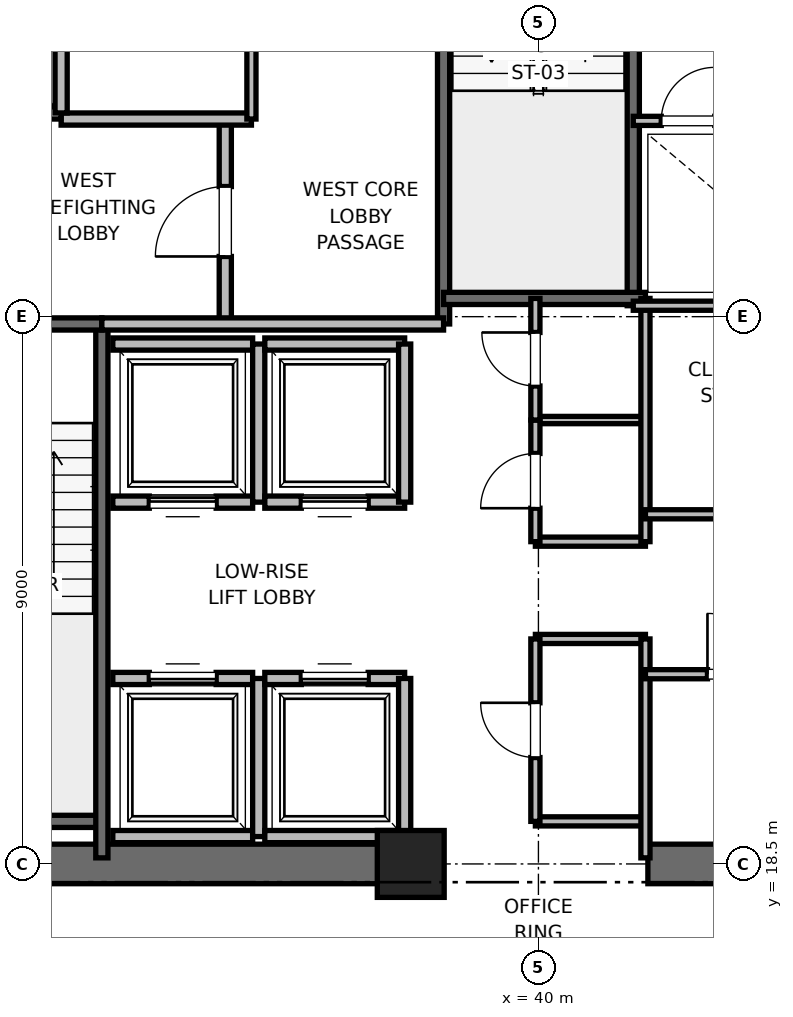
"""IFC4 building model, lengths in metres.
Left out: names, types, materials, properties, quantities, classifications, styles, units other than length and angle.
Written with IfcOpenShell. Run it as: python <this file> out.ifc"""

import sys

from ifc_helpers import new_model, si_unit, direction, frame, frame_2d, origin, origin_2d, place, context, subcontext, project, spatial, rectangle, extrude, element, fill, save


model = new_model("IFC4")
c1 = context("Model", 3, precision=1e-05, world=origin(), true_north=direction((0.0, 1.0)))
c2 = subcontext(c1, "Body", "Model", "MODEL_VIEW")
j1 = project(units=[si_unit("LENGTHUNIT", "METRE"), si_unit("PLANEANGLEUNIT", "RADIAN")], contexts=[c1])
p1 = place(None, origin())
s1 = spatial("IfcSite", under=j1, at=p1, CompositionType="ELEMENT")
p2 = place(p1, origin())
s2 = spatial("IfcBuilding", under=s1, at=p2, CompositionType="ELEMENT")
p3 = place(p2, frame((0.0, 0.0, 83.6)))
s3 = spatial("IfcBuildingStorey", under=s2, at=p3, CompositionType="ELEMENT", Elevation=83.6)
p4 = place(p3, frame((37.9, 18.5, 0.0), z_axis=(0.0, 0.0, 1.0), x_axis=(1.0, 0.0, 0.0)))
e1 = element("IfcColumn", 1, at=p4, inside=s3, PredefinedType="PILASTER", context=c2, shape_type="SweptSolid", body=[
    extrude(rectangle(XDim=1.1, YDim=1.1, at=origin_2d()), origin(), (0.0, 0.0, 1.0), 4.0),
])
for number, where, z_axis, x_axis in (
    (2, (29.0, 18.5, 0.0), (0.0, 0.0, 1.0), (1.0, 0.0, 0.0)),
    (3, (41.8, 18.5, 0.0), (0.0, 0.0, 1.0), (1.0, 0.0, 0.0)),
):
    element("IfcWall", number, at=place(p3, frame(where, z_axis=z_axis, x_axis=x_axis)), inside=s3, PredefinedType="SHEAR", context=c2, shape_type="SweptSolid", body=[
        extrude(rectangle(XDim=9.2, YDim=0.65, at=frame_2d((4.6, 0.0))), origin(), (0.0, 0.0, 1.0), 3.76),
    ])
p5 = place(p3, frame((29.7, 19.2, 0.0), z_axis=(0.0, 0.0, 1.0), x_axis=(1.0, 0.0, 0.0)))
e4 = element("IfcWall", 4, at=p5, inside=s3, PredefinedType="SOLIDWALL", context=c2, shape_type="SweptSolid", body=[
    extrude(rectangle(XDim=3.12, YDim=0.2, at=frame_2d((1.56, 0.0))), origin(), (0.0, 0.0, 1.0), 3.76),
])
p6 = place(p3, frame((32.82, 18.6, 0.0), z_axis=(0.0, 0.0, 1.0), x_axis=(0.0, 1.0, 0.0)))
e5 = element("IfcWall", 5, at=p6, inside=s3, PredefinedType="SOLIDWALL", context=c2, shape_type="SweptSolid", body=[
    extrude(rectangle(XDim=8.78, YDim=0.2, at=frame_2d((4.39, 0.0))), origin(), (0.0, 0.0, 1.0), 3.76),
])
p7 = place(p3, frame((29.7, 27.38, 0.0), z_axis=(0.0, 0.0, 1.0), x_axis=(1.0, 0.0, 0.0)))
e6 = element("IfcWall", 6, at=p7, inside=s3, PredefinedType="SOLIDWALL", context=c2, shape_type="SweptSolid", body=[
    extrude(rectangle(XDim=3.12, YDim=0.2, at=frame_2d((1.56, 0.0))), origin(), (0.0, 0.0, 1.0), 3.76),
])
p8 = place(p7, frame((1.01, 0.0, 0.0)))
e7 = element("IfcOpeningElement", 7, at=p8, cuts=e6, PredefinedType="OPENING", context=c2, shape_type="SweptSolid", body=[
    extrude(rectangle(XDim=1.1, YDim=2.15, at=frame_2d((0.55, 1.075))), frame((0.0, 0.1, 0.0), z_axis=(0.0, -1.0, 0.0), x_axis=(1.0, 0.0, 0.0)), (0.0, 0.0, 1.0), 0.2),
])
p9 = place(p3, frame((38.44, 27.38, 0.0), z_axis=(0.0, 0.0, 1.0), x_axis=(0.0, 1.0, 0.0)))
e8 = element("IfcWall", 8, at=p9, inside=s3, PredefinedType="SOLIDWALL", context=c2, shape_type="SweptSolid", body=[
    extrude(rectangle(XDim=8.87, YDim=0.2, at=frame_2d((4.435, 0.0))), origin(), (0.0, 0.0, 1.0), 3.76),
])
p10 = place(p3, frame((41.56, 27.68, 0.0), z_axis=(0.0, 0.0, 1.0), x_axis=(0.0, 1.0, 0.0)))
e9 = element("IfcWall", 9, at=p10, inside=s3, PredefinedType="SOLIDWALL", context=c2, shape_type="SweptSolid", body=[
    extrude(rectangle(XDim=8.57, YDim=0.2, at=frame_2d((4.285, 0.0))), origin(), (0.0, 0.0, 1.0), 3.76),
])
p11 = place(p3, frame((38.44, 27.8, 0.0), z_axis=(0.0, 0.0, 1.0), x_axis=(1.0, 0.0, 0.0)))
e10 = element("IfcWall", 10, at=p11, inside=s3, PredefinedType="SOLIDWALL", context=c2, shape_type="SweptSolid", body=[
    extrude(rectangle(XDim=3.32, YDim=0.2, at=frame_2d((1.66, 0.0))), origin(), (0.0, 0.0, 1.0), 3.76),
])
p12 = place(p3, frame((34.85, 27.38, 0.0), z_axis=(0.0, 0.0, 1.0), x_axis=(0.0, 1.0, 0.0)))
e11 = element("IfcWall", 11, at=p12, inside=s3, PredefinedType="PARTITIONING", context=c2, shape_type="SweptSolid", body=[
    extrude(rectangle(XDim=3.37, YDim=0.2, at=frame_2d((1.685, 0.0))), origin(), (0.0, 0.0, 1.0), 3.76),
])
p13 = place(p12, frame((1.11, 0.0, 0.0)))
e12 = element("IfcOpeningElement", 12, at=p13, cuts=e11, PredefinedType="OPENING", context=c2, shape_type="SweptSolid", body=[
    extrude(rectangle(XDim=1.15, YDim=2.2, at=frame_2d((0.575, 1.1))), frame((0.0, 0.1, 0.0), z_axis=(0.0, -1.0, 0.0), x_axis=(1.0, 0.0, 0.0)), (0.0, 0.0, 1.0), 0.2),
])
p14 = place(p3, frame((32.82, 27.38, 0.0), z_axis=(0.0, 0.0, 1.0), x_axis=(1.0, 0.0, 0.0)))
e13 = element("IfcWall", 13, at=p14, inside=s3, PredefinedType="PARTITIONING", context=c2, shape_type="SweptSolid", body=[
    extrude(rectangle(XDim=5.62, YDim=0.2, at=frame_2d((2.81, 0.0))), origin(), (0.0, 0.0, 1.0), 3.76),
])
p15 = place(p3, frame((32.15, 30.75, 0.0), z_axis=(0.0, 0.0, 1.0), x_axis=(1.0, 0.0, 0.0)))
e14 = element("IfcWall", 14, at=p15, inside=s3, PredefinedType="PARTITIONING", context=c2, shape_type="SweptSolid", body=[
    extrude(rectangle(XDim=3.13, YDim=0.2, at=frame_2d((1.565, 0.0))), origin(), (0.0, 0.0, 1.0), 3.76),
])
p16 = place(p3, frame((29.55, 30.85, 0.0), z_axis=(0.0, 0.0, 1.0), x_axis=(1.0, 0.0, 0.0)))
e15 = element("IfcWall", 15, at=p16, inside=s3, PredefinedType="SOLIDWALL", context=c2, shape_type="SweptSolid", body=[
    extrude(rectangle(XDim=2.6, YDim=0.2, at=frame_2d((1.3, 0.0))), origin(), (0.0, 0.0, 1.0), 2.54),
])
p17 = place(p16, frame((0.75, 0.0, 0.0)))
e16 = element("IfcOpeningElement", 16, at=p17, cuts=e15, PredefinedType="OPENING", context=c2, shape_type="SweptSolid", body=[
    extrude(rectangle(XDim=1.1, YDim=2.2, at=frame_2d((0.55, 1.1))), frame((0.0, 0.1, 0.0), z_axis=(0.0, -1.0, 0.0), x_axis=(1.0, 0.0, 0.0)), (0.0, 0.0, 1.0), 0.2),
])
p18 = place(p3, frame((32.15, 30.85, 0.0), z_axis=(0.0, 0.0, 1.0), x_axis=(0.0, 1.0, 0.0)))
e17 = element("IfcWall", 17, at=p18, inside=s3, PredefinedType="SOLIDWALL", context=c2, shape_type="SweptSolid", body=[
    extrude(rectangle(XDim=3.0, YDim=0.2, at=frame_2d((1.5, 0.0))), origin(), (0.0, 0.0, 1.0), 3.76),
])
p19 = place(p3, frame((33.0, 18.95, 0.0), z_axis=(0.0, 0.0, 1.0), x_axis=(1.0, 0.0, 0.0)))
e18 = element("IfcWall", 18, at=p19, inside=s3, PredefinedType="SOLIDWALL", context=c2, shape_type="SweptSolid", body=[
    extrude(rectangle(XDim=2.3, YDim=0.2, at=frame_2d((1.15, 0.0))), origin(), (0.0, 0.0, 1.0), 3.76),
])
p20 = place(p3, frame((35.3, 21.55, 0.0), z_axis=(0.0, 0.0, 1.0), x_axis=(-1.0, 0.0, 0.0)))
e19 = element("IfcWall", 19, at=p20, inside=s3, PredefinedType="SOLIDWALL", context=c2, shape_type="SweptSolid", body=[
    extrude(rectangle(XDim=2.3, YDim=0.2, at=frame_2d((1.15, 0.0))), origin(), (0.0, 0.0, 1.0), 3.76),
])
p21 = place(p20, frame((0.6, 0.0, 0.0)))
e20 = element("IfcOpeningElement", 20, at=p21, cuts=e19, PredefinedType="OPENING", context=c2, shape_type="SweptSolid", body=[
    extrude(rectangle(XDim=1.1, YDim=2.2, at=frame_2d((0.55, 1.1))), frame((0.0, 0.1, 0.0), z_axis=(0.0, -1.0, 0.0), x_axis=(1.0, 0.0, 0.0)), (0.0, 0.0, 1.0), 0.2),
])
p22 = place(p3, frame((35.4, 18.95, 0.0), z_axis=(0.0, 0.0, 1.0), x_axis=(0.0, 1.0, 0.0)))
e21 = element("IfcWall", 21, at=p22, inside=s3, PredefinedType="SOLIDWALL", context=c2, shape_type="SweptSolid", body=[
    extrude(rectangle(XDim=2.6, YDim=0.2, at=frame_2d((1.3, 0.0))), origin(), (0.0, 0.0, 1.0), 3.76),
])
p23 = place(p3, frame((35.5, 18.95, 0.0), z_axis=(0.0, 0.0, 1.0), x_axis=(1.0, 0.0, 0.0)))
e22 = element("IfcWall", 22, at=p23, inside=s3, PredefinedType="SOLIDWALL", context=c2, shape_type="SweptSolid", body=[
    extrude(rectangle(XDim=2.3, YDim=0.2, at=frame_2d((1.15, 0.0))), origin(), (0.0, 0.0, 1.0), 2.54),
])
p24 = place(p3, frame((37.8, 21.55, 0.0), z_axis=(0.0, 0.0, 1.0), x_axis=(-1.0, 0.0, 0.0)))
e23 = element("IfcWall", 23, at=p24, inside=s3, PredefinedType="SOLIDWALL", context=c2, shape_type="SweptSolid", body=[
    extrude(rectangle(XDim=2.3, YDim=0.2, at=frame_2d((1.15, 0.0))), origin(), (0.0, 0.0, 1.0), 3.76),
])
p25 = place(p24, frame((0.6, 0.0, 0.0)))
e24 = element("IfcOpeningElement", 24, at=p25, cuts=e23, PredefinedType="OPENING", context=c2, shape_type="SweptSolid", body=[
    extrude(rectangle(XDim=1.1, YDim=2.2, at=frame_2d((0.55, 1.1))), frame((0.0, 0.1, 0.0), z_axis=(0.0, -1.0, 0.0), x_axis=(1.0, 0.0, 0.0)), (0.0, 0.0, 1.0), 0.2),
])
p26 = place(p3, frame((37.8, 18.95, 0.0), z_axis=(0.0, 0.0, 1.0), x_axis=(0.0, 1.0, 0.0)))
e25 = element("IfcWall", 25, at=p26, inside=s3, PredefinedType="SOLIDWALL", context=c2, shape_type="SweptSolid", body=[
    extrude(rectangle(XDim=2.6, YDim=0.2, at=frame_2d((1.3, 0.0))), origin(), (0.0, 0.0, 1.0), 2.54),
])
p27 = place(p3, frame((33.0, 24.45, 0.0), z_axis=(0.0, 0.0, 1.0), x_axis=(1.0, 0.0, 0.0)))
e26 = element("IfcWall", 26, at=p27, inside=s3, PredefinedType="SOLIDWALL", context=c2, shape_type="SweptSolid", body=[
    extrude(rectangle(XDim=2.3, YDim=0.2, at=frame_2d((1.15, 0.0))), origin(), (0.0, 0.0, 1.0), 3.76),
])
p28 = place(p27, frame((0.6, 0.0, 0.0)))
e27 = element("IfcOpeningElement", 27, at=p28, cuts=e26, PredefinedType="OPENING", context=c2, shape_type="SweptSolid", body=[
    extrude(rectangle(XDim=1.1, YDim=2.2, at=frame_2d((0.55, 1.1))), frame((0.0, 0.1, 0.0), z_axis=(0.0, -1.0, 0.0), x_axis=(1.0, 0.0, 0.0)), (0.0, 0.0, 1.0), 0.2),
])
p29 = place(p3, frame((35.3, 27.05, 0.0), z_axis=(0.0, 0.0, 1.0), x_axis=(-1.0, 0.0, 0.0)))
e28 = element("IfcWall", 28, at=p29, inside=s3, PredefinedType="SOLIDWALL", context=c2, shape_type="SweptSolid", body=[
    extrude(rectangle(XDim=2.3, YDim=0.2, at=frame_2d((1.15, 0.0))), origin(), (0.0, 0.0, 1.0), 3.76),
])
p30 = place(p3, frame((35.4, 24.45, 0.0), z_axis=(0.0, 0.0, 1.0), x_axis=(0.0, 1.0, 0.0)))
e29 = element("IfcWall", 29, at=p30, inside=s3, PredefinedType="SOLIDWALL", context=c2, shape_type="SweptSolid", body=[
    extrude(rectangle(XDim=2.6, YDim=0.2, at=frame_2d((1.3, 0.0))), origin(), (0.0, 0.0, 1.0), 3.76),
])
p31 = place(p3, frame((35.5, 24.45, 0.0), z_axis=(0.0, 0.0, 1.0), x_axis=(1.0, 0.0, 0.0)))
e30 = element("IfcWall", 30, at=p31, inside=s3, PredefinedType="SOLIDWALL", context=c2, shape_type="SweptSolid", body=[
    extrude(rectangle(XDim=2.3, YDim=0.2, at=frame_2d((1.15, 0.0))), origin(), (0.0, 0.0, 1.0), 3.76),
])
p32 = place(p31, frame((0.6, 0.0, 0.0)))
e31 = element("IfcOpeningElement", 31, at=p32, cuts=e30, PredefinedType="OPENING", context=c2, shape_type="SweptSolid", body=[
    extrude(rectangle(XDim=1.1, YDim=2.2, at=frame_2d((0.55, 1.1))), frame((0.0, 0.1, 0.0), z_axis=(0.0, -1.0, 0.0), x_axis=(1.0, 0.0, 0.0)), (0.0, 0.0, 1.0), 0.2),
])
p33 = place(p3, frame((37.8, 27.05, 0.0), z_axis=(0.0, 0.0, 1.0), x_axis=(-1.0, 0.0, 0.0)))
e32 = element("IfcWall", 32, at=p33, inside=s3, PredefinedType="SOLIDWALL", context=c2, shape_type="SweptSolid", body=[
    extrude(rectangle(XDim=2.3, YDim=0.2, at=frame_2d((1.15, 0.0))), origin(), (0.0, 0.0, 1.0), 3.76),
])
p34 = place(p3, frame((37.8, 24.45, 0.0), z_axis=(0.0, 0.0, 1.0), x_axis=(0.0, 1.0, 0.0)))
e33 = element("IfcWall", 33, at=p34, inside=s3, PredefinedType="SOLIDWALL", context=c2, shape_type="SweptSolid", body=[
    extrude(rectangle(XDim=2.6, YDim=0.2, at=frame_2d((1.3, 0.0))), origin(), (0.0, 0.0, 1.0), 3.76),
])
for number, where, z_axis, x_axis in (
    (34, (39.95, 19.2, 0.0), (0.0, 0.0, 1.0), (1.0, 0.0, 0.0)),
    (35, (39.95, 22.2, 0.0), (0.0, 0.0, 1.0), (1.0, 0.0, 0.0)),
    (36, (39.95, 23.8, 0.0), (0.0, 0.0, 1.0), (1.0, 0.0, 0.0)),
):
    element("IfcWall", number, at=place(p3, frame(where, z_axis=z_axis, x_axis=x_axis)), inside=s3, PredefinedType="PARTITIONING", context=c2, shape_type="SweptSolid", body=[
        extrude(rectangle(XDim=1.81, YDim=0.15, at=frame_2d((0.905, 0.0))), origin(), (0.0, 0.0, 1.0), 2.85),
    ])
p35 = place(p3, frame((39.95, 25.8, 0.0), z_axis=(0.0, 0.0, 1.0), x_axis=(1.0, 0.0, 0.0)))
e37 = element("IfcWall", 37, at=p35, inside=s3, PredefinedType="PARTITIONING", context=c2, shape_type="SweptSolid", body=[
    extrude(rectangle(XDim=1.81, YDim=0.12, at=frame_2d((0.905, 0.0))), origin(), (0.0, 0.0, 1.0), 2.85),
])
p36 = place(p3, frame((41.76, 18.6, 0.0), z_axis=(0.0, 0.0, 1.0), x_axis=(0.0, 1.0, 0.0)))
e38 = element("IfcWall", 38, at=p36, inside=s3, PredefinedType="PARTITIONING", context=c2, shape_type="SweptSolid", body=[
    extrude(rectangle(XDim=3.6, YDim=0.15, at=frame_2d((1.8, 0.0))), origin(), (0.0, 0.0, 1.0), 2.54),
])
p37 = place(p3, frame((41.76, 23.8, 0.0), z_axis=(0.0, 0.0, 1.0), x_axis=(0.0, 1.0, 0.0)))
e39 = element("IfcWall", 39, at=p37, inside=s3, PredefinedType="PARTITIONING", context=c2, shape_type="SweptSolid", body=[
    extrude(rectangle(XDim=4.0, YDim=0.15, at=frame_2d((2.0, 0.0))), origin(), (0.0, 0.0, 1.0), 2.85),
])
p38 = place(p3, frame((39.95, 19.2, 0.0), z_axis=(0.0, 0.0, 1.0), x_axis=(0.0, 1.0, 0.0)))
e40 = element("IfcWall", 40, at=p38, inside=s3, PredefinedType="PARTITIONING", context=c2, shape_type="SweptSolid", body=[
    extrude(rectangle(XDim=3.0, YDim=0.15, at=frame_2d((1.5, 0.0))), origin(), (0.0, 0.0, 1.0), 2.85),
])
p39 = place(p38, frame((1.05, 0.0, 0.0)))
e41 = element("IfcOpeningElement", 41, at=p39, cuts=e40, PredefinedType="OPENING", context=c2, shape_type="SweptSolid", body=[
    extrude(rectangle(XDim=0.9, YDim=2.1, at=frame_2d((0.45, 1.05))), frame((0.0, 0.075, 0.0), z_axis=(0.0, -1.0, 0.0), x_axis=(1.0, 0.0, 0.0)), (0.0, 0.0, 1.0), 0.15),
])
p40 = place(p3, frame((39.95, 23.8, 0.0), z_axis=(0.0, 0.0, 1.0), x_axis=(0.0, 1.0, 0.0)))
e42 = element("IfcWall", 42, at=p40, inside=s3, PredefinedType="PARTITIONING", context=c2, shape_type="SweptSolid", body=[
    extrude(rectangle(XDim=2.0, YDim=0.15, at=frame_2d((1.0, 0.0))), origin(), (0.0, 0.0, 1.0), 2.85),
])
p41 = place(p40, frame((0.55, 0.0, 0.0)))
e43 = element("IfcOpeningElement", 43, at=p41, cuts=e42, PredefinedType="OPENING", context=c2, shape_type="SweptSolid", body=[
    extrude(rectangle(XDim=0.9, YDim=2.1, at=frame_2d((0.45, 1.05))), frame((0.0, 0.075, 0.0), z_axis=(0.0, -1.0, 0.0), x_axis=(1.0, 0.0, 0.0)), (0.0, 0.0, 1.0), 0.15),
])
p42 = place(p3, frame((39.95, 25.8, 0.0), z_axis=(0.0, 0.0, 1.0), x_axis=(0.0, 1.0, 0.0)))
e44 = element("IfcWall", 44, at=p42, inside=s3, PredefinedType="PARTITIONING", context=c2, shape_type="SweptSolid", body=[
    extrude(rectangle(XDim=2.0, YDim=0.15, at=frame_2d((1.0, 0.0))), origin(), (0.0, 0.0, 1.0), 2.85),
])
p43 = place(p42, frame((0.56, 0.0, 0.0)))
e45 = element("IfcOpeningElement", 45, at=p43, cuts=e44, PredefinedType="OPENING", context=c2, shape_type="SweptSolid", body=[
    extrude(rectangle(XDim=0.88, YDim=2.1, at=frame_2d((0.44, 1.05))), frame((0.0, 0.075, 0.0), z_axis=(0.0, -1.0, 0.0), x_axis=(1.0, 0.0, 0.0)), (0.0, 0.0, 1.0), 0.15),
])
p44 = place(p3, frame((35.28, 30.75, 0.0), z_axis=(0.0, 0.0, 1.0), x_axis=(0.0, 1.0, 0.0)))
e46 = element("IfcWall", 46, at=p44, inside=s3, PredefinedType="PARTITIONING", context=c2, shape_type="SweptSolid", body=[
    extrude(rectangle(XDim=3.2, YDim=0.15, at=frame_2d((1.6, 0.0))), origin(), (0.0, 0.0, 1.0), 2.85),
])
p45 = place(p44, frame((1.15, 0.0, 0.0)))
e47 = element("IfcOpeningElement", 47, at=p45, cuts=e46, PredefinedType="OPENING", context=c2, shape_type="SweptSolid", body=[
    extrude(rectangle(XDim=0.9, YDim=2.1, at=frame_2d((0.45, 1.05))), frame((0.0, 0.075, 0.0), z_axis=(0.0, -1.0, 0.0), x_axis=(1.0, 0.0, 0.0)), (0.0, 0.0, 1.0), 0.15),
])
p46 = place(p3, frame((41.56, 27.68, 0.0), z_axis=(0.0, 0.0, 1.0), x_axis=(1.0, 0.0, 0.0)))
e48 = element("IfcWall", 48, at=p46, inside=s3, PredefinedType="PARTITIONING", context=c2, shape_type="SweptSolid", body=[
    extrude(rectangle(XDim=3.59, YDim=0.15, at=frame_2d((1.795, 0.0))), origin(), (0.0, 0.0, 1.0), 2.85),
])
p47 = place(p3, frame((41.76, 21.62, 0.0), z_axis=(0.0, 0.0, 1.0), x_axis=(1.0, 0.0, 0.0)))
e49 = element("IfcWall", 49, at=p47, inside=s3, PredefinedType="PARTITIONING", context=c2, shape_type="SweptSolid", body=[
    extrude(rectangle(XDim=3.04, YDim=0.15, at=frame_2d((1.52, 0.0))), origin(), (0.0, 0.0, 1.0), 2.85),
])
p48 = place(p47, frame((1.02, 0.0, 0.0)))
e50 = element("IfcOpeningElement", 50, at=p48, cuts=e49, PredefinedType="OPENING", context=c2, shape_type="SweptSolid", body=[
    extrude(rectangle(XDim=1.0, YDim=2.15, at=frame_2d((0.5, 1.075))), frame((0.0, 0.075, 0.0), z_axis=(0.0, -1.0, 0.0), x_axis=(1.0, 0.0, 0.0)), (0.0, 0.0, 1.0), 0.15),
])
p49 = place(p3, frame((41.76, 24.25, 0.0), z_axis=(0.0, 0.0, 1.0), x_axis=(1.0, 0.0, 0.0)))
e51 = element("IfcWall", 51, at=p49, inside=s3, PredefinedType="PARTITIONING", context=c2, shape_type="SweptSolid", body=[
    extrude(rectangle(XDim=3.39, YDim=0.15, at=frame_2d((1.695, 0.0))), origin(), (0.0, 0.0, 1.0), 2.85),
])
p50 = place(p49, frame((1.255, 0.0, 0.0)))
e52 = element("IfcOpeningElement", 52, at=p50, cuts=e51, PredefinedType="OPENING", context=c2, shape_type="SweptSolid", body=[
    extrude(rectangle(XDim=0.88, YDim=2.1, at=frame_2d((0.44, 1.05))), frame((0.0, 0.075, 0.0), z_axis=(0.0, -1.0, 0.0), x_axis=(1.0, 0.0, 0.0)), (0.0, 0.0, 1.0), 0.15),
])
p51 = place(p3, frame((41.56, 30.72, 0.0), z_axis=(0.0, 0.0, 1.0), x_axis=(1.0, 0.0, 0.0)))
e53 = element("IfcWall", 53, at=p51, inside=s3, PredefinedType="PARTITIONING", context=c2, shape_type="SweptSolid", body=[
    extrude(rectangle(XDim=1.8, YDim=0.15, at=frame_2d((0.9, 0.0))), origin(), (0.0, 0.0, 1.0), 2.85),
])
p52 = place(p51, frame((0.46, 0.0, 0.0)))
e54 = element("IfcOpeningElement", 54, at=p52, cuts=e53, PredefinedType="OPENING", context=c2, shape_type="SweptSolid", body=[
    extrude(rectangle(XDim=0.88, YDim=2.1, at=frame_2d((0.44, 1.05))), frame((0.0, 0.075, 0.0), z_axis=(0.0, -1.0, 0.0), x_axis=(1.0, 0.0, 0.0)), (0.0, 0.0, 1.0), 0.15),
])
p53 = place(p13, origin())
e55 = element("IfcDoor", 55, at=p53, inside=s3, OperationType="SINGLE_SWING_LEFT", PredefinedType="DOOR", context=c2, shape_type="SweptSolid", body=[
    extrude(rectangle(XDim=1.15, YDim=2.2, at=frame_2d((0.575, 1.1))), frame((0.0, 0.025, 0.0), z_axis=(0.0, -1.0, 0.0), x_axis=(1.0, 0.0, 0.0)), (0.0, 0.0, 1.0), 0.05),
])
fill(e12, e55)
p54 = place(p21, origin())
e56 = element("IfcDoor", 56, at=p54, inside=s3, OperationType="SLIDING_TO_RIGHT", PredefinedType="DOOR", context=c2, shape_type="SweptSolid", body=[
    extrude(rectangle(XDim=1.1, YDim=2.2, at=frame_2d((0.55, 1.1))), frame((0.0, 0.025, 0.0), z_axis=(0.0, -1.0, 0.0), x_axis=(1.0, 0.0, 0.0)), (0.0, 0.0, 1.0), 0.05),
])
fill(e20, e56)
p55 = place(p25, origin())
e57 = element("IfcDoor", 57, at=p55, inside=s3, OperationType="SLIDING_TO_RIGHT", PredefinedType="DOOR", context=c2, shape_type="SweptSolid", body=[
    extrude(rectangle(XDim=1.1, YDim=2.2, at=frame_2d((0.55, 1.1))), frame((0.0, 0.025, 0.0), z_axis=(0.0, -1.0, 0.0), x_axis=(1.0, 0.0, 0.0)), (0.0, 0.0, 1.0), 0.05),
])
fill(e24, e57)
p56 = place(p28, origin())
e58 = element("IfcDoor", 58, at=p56, inside=s3, OperationType="SLIDING_TO_RIGHT", PredefinedType="DOOR", context=c2, shape_type="SweptSolid", body=[
    extrude(rectangle(XDim=1.1, YDim=2.2, at=frame_2d((0.55, 1.1))), frame((0.0, 0.025, 0.0), z_axis=(0.0, -1.0, 0.0), x_axis=(1.0, 0.0, 0.0)), (0.0, 0.0, 1.0), 0.05),
])
fill(e27, e58)
p57 = place(p32, origin())
e59 = element("IfcDoor", 59, at=p57, inside=s3, OperationType="SLIDING_TO_RIGHT", PredefinedType="DOOR", context=c2, shape_type="SweptSolid", body=[
    extrude(rectangle(XDim=1.1, YDim=2.2, at=frame_2d((0.55, 1.1))), frame((0.0, 0.025, 0.0), z_axis=(0.0, -1.0, 0.0), x_axis=(1.0, 0.0, 0.0)), (0.0, 0.0, 1.0), 0.05),
])
fill(e31, e59)
p58 = place(p39, origin())
e60 = element("IfcDoor", 60, at=p58, inside=s3, OperationType="SINGLE_SWING_RIGHT", PredefinedType="DOOR", context=c2, shape_type="SweptSolid", body=[
    extrude(rectangle(XDim=0.9, YDim=2.1, at=frame_2d((0.45, 1.05))), frame((0.0, 0.025, 0.0), z_axis=(0.0, -1.0, 0.0), x_axis=(1.0, 0.0, 0.0)), (0.0, 0.0, 1.0), 0.05),
])
fill(e41, e60)
p59 = place(p41, origin())
e61 = element("IfcDoor", 61, at=p59, inside=s3, OperationType="SINGLE_SWING_LEFT", PredefinedType="DOOR", context=c2, shape_type="SweptSolid", body=[
    extrude(rectangle(XDim=0.9, YDim=2.1, at=frame_2d((0.45, 1.05))), frame((0.0, 0.025, 0.0), z_axis=(0.0, -1.0, 0.0), x_axis=(1.0, 0.0, 0.0)), (0.0, 0.0, 1.0), 0.05),
])
fill(e43, e61)
p60 = place(p43, origin())
e62 = element("IfcDoor", 62, at=p60, inside=s3, OperationType="SINGLE_SWING_RIGHT", PredefinedType="DOOR", context=c2, shape_type="SweptSolid", body=[
    extrude(rectangle(XDim=0.88, YDim=2.1, at=frame_2d((0.44, 1.05))), frame((0.0, 0.025, 0.0), z_axis=(0.0, -1.0, 0.0), x_axis=(1.0, 0.0, 0.0)), (0.0, 0.0, 1.0), 0.05),
])
fill(e45, e62)
p61 = place(p48, origin())
e63 = element("IfcDoor", 63, at=p61, inside=s3, OperationType="SINGLE_SWING_LEFT", PredefinedType="DOOR", context=c2, shape_type="SweptSolid", body=[
    extrude(rectangle(XDim=1.0, YDim=2.15, at=frame_2d((0.5, 1.075))), frame((0.0, 0.025, 0.0), z_axis=(0.0, -1.0, 0.0), x_axis=(1.0, 0.0, 0.0)), (0.0, 0.0, 1.0), 0.05),
])
fill(e50, e63)
p62 = place(p52, origin())
e64 = element("IfcDoor", 64, at=p62, inside=s3, OperationType="SINGLE_SWING_RIGHT", PredefinedType="DOOR", context=c2, shape_type="SweptSolid", body=[
    extrude(rectangle(XDim=0.88, YDim=2.1, at=frame_2d((0.44, 1.05))), frame((0.0, 0.025, 0.0), z_axis=(0.0, -1.0, 0.0), x_axis=(1.0, 0.0, 0.0)), (0.0, 0.0, 1.0), 0.05),
])
fill(e54, e64)
save(model, sys.argv[1])
